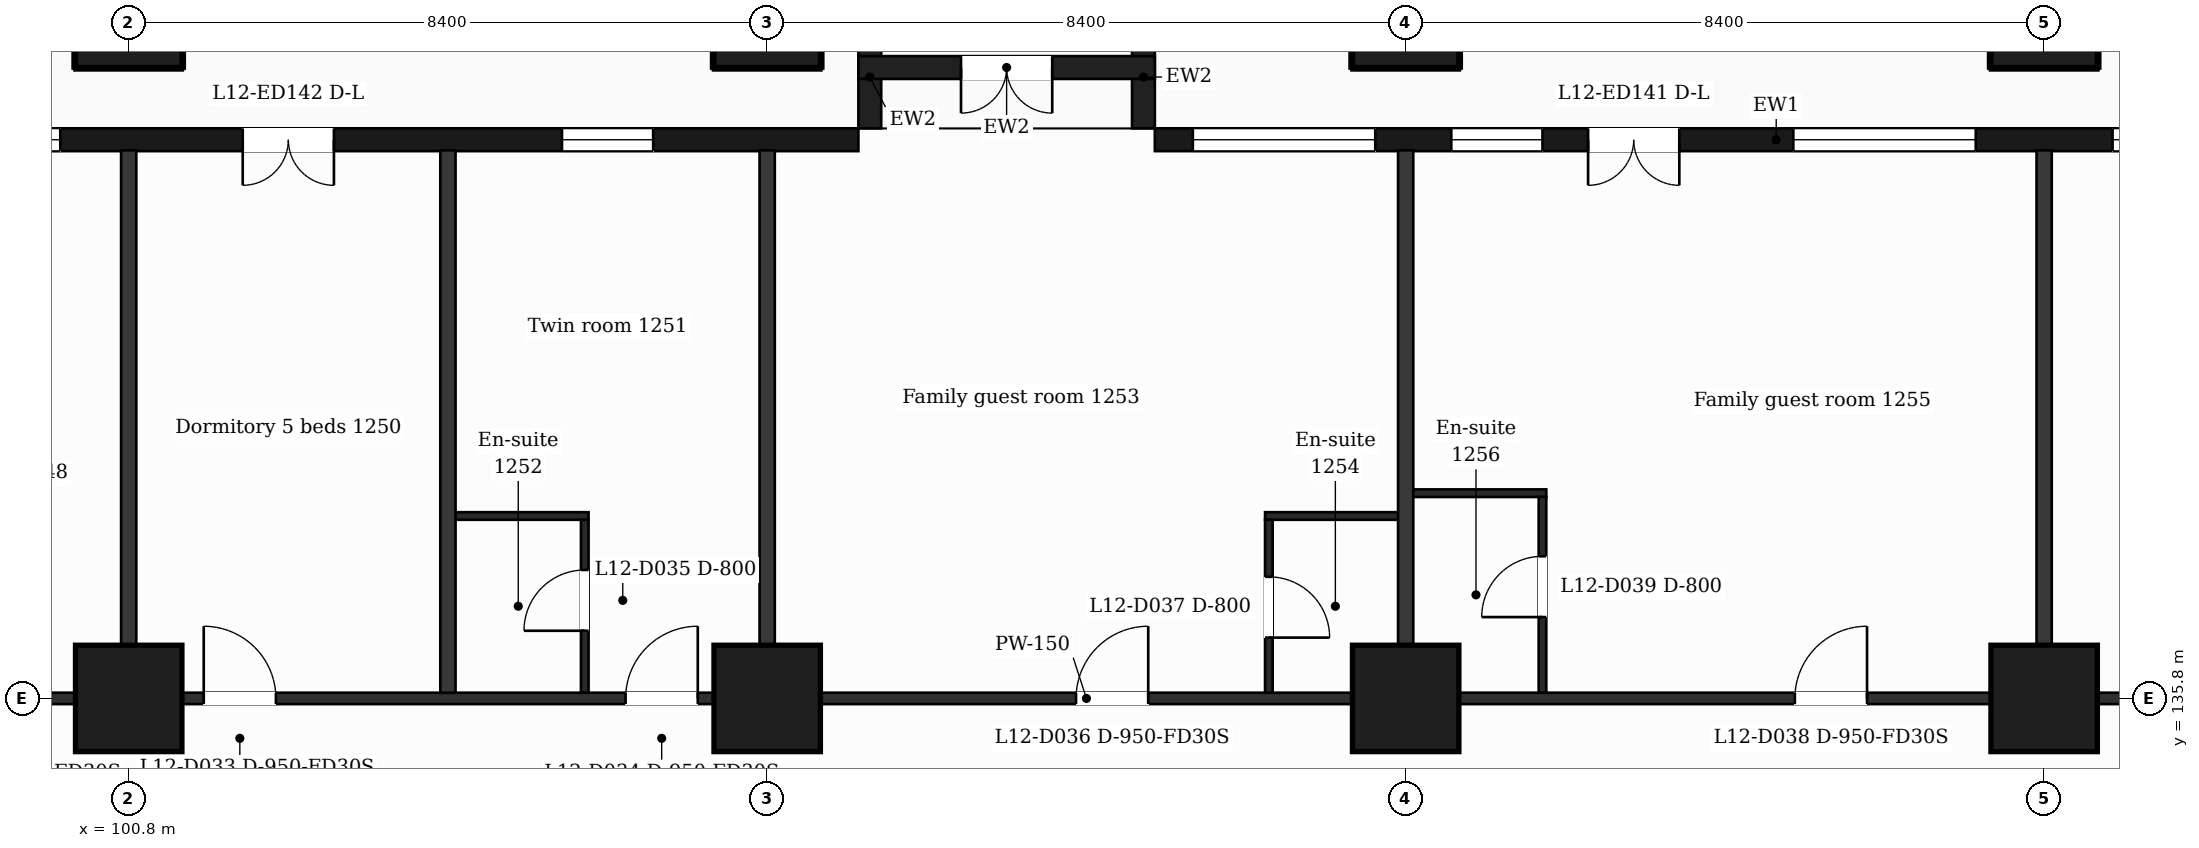
"""IFC4 building model, lengths in metres.
Left out: names, types, materials, properties, quantities, classifications, styles, units other than length and angle.
Written with IfcOpenShell. Run it as: python <this file> out.ifc"""

import sys

from ifc_helpers import new_model, si_unit, direction, frame, frame_2d, origin, origin_2d, place, context, subcontext, project, spatial, rectangle, extrude, element, fill, save


model = new_model("IFC4")
c1 = context("Model", 3, precision=1e-05, world=origin(), true_north=direction((0.0, 1.0)))
c2 = subcontext(c1, "Body", "Model", "MODEL_VIEW")
j1 = project(units=[si_unit("LENGTHUNIT", "METRE"), si_unit("PLANEANGLEUNIT", "RADIAN")], contexts=[c1])
p1 = place(None, origin())
s1 = spatial("IfcSite", under=j1, at=p1, CompositionType="ELEMENT")
p2 = place(p1, origin())
s2 = spatial("IfcBuilding", under=s1, at=p2, CompositionType="ELEMENT")
p3 = place(p2, frame((0.0, 0.0, 60.0)))
s3 = spatial("IfcBuildingStorey", under=s2, at=p3, CompositionType="ELEMENT", Elevation=60.0)
for number, where, z_axis, x_axis in (
    (1, (100.8, 135.8, 0.0), (0.0, 0.0, 1.0), (1.0, 0.0, 0.0)),
    (2, (109.2, 135.8, 0.0), (0.0, 0.0, 1.0), (1.0, 0.0, 0.0)),
    (3, (117.6, 135.8, 0.0), (0.0, 0.0, 1.0), (1.0, 0.0, 0.0)),
    (4, (126.0, 135.8, 0.0), (0.0, 0.0, 1.0), (1.0, 0.0, 0.0)),
    (5, (100.8, 144.8, 0.0), (0.0, 0.0, 1.0), (1.0, 0.0, 0.0)),
    (6, (109.2, 144.8, 0.0), (0.0, 0.0, 1.0), (1.0, 0.0, 0.0)),
    (7, (117.6, 144.8, 0.0), (0.0, 0.0, 1.0), (1.0, 0.0, 0.0)),
    (8, (126.0, 144.8, 0.0), (0.0, 0.0, 1.0), (1.0, 0.0, 0.0)),
):
    element("IfcColumn", number, at=place(p3, frame(where, z_axis=z_axis, x_axis=x_axis)), inside=s3, PredefinedType="COLUMN", context=c2, shape_type="SweptSolid", body=[
        extrude(rectangle(XDim=1.4, YDim=1.4, at=origin_2d()), origin(), (0.0, 0.0, 1.0), 3.5),
    ])
p4 = place(p3, frame((130.65, 143.15, 0.0), z_axis=(0.0, 0.0, 1.0), x_axis=(-1.0, 0.0, 0.0)))
e9 = element("IfcWall", 9, at=p4, inside=s3, PredefinedType="SOLIDWALL", context=c2, shape_type="SweptSolid", body=[
    extrude(rectangle(XDim=16.35, YDim=0.3, at=frame_2d((8.175, 0.0))), origin(), (0.0, 0.0, 1.0), 3.18),
])
p5 = place(p4, frame((1.35, 0.0, 0.9)))
e10 = element("IfcOpeningElement", 10, at=p5, cuts=e9, PredefinedType="OPENING", context=c2, shape_type="SweptSolid", body=[
    extrude(rectangle(XDim=2.4, YDim=2.1, at=frame_2d((1.2, 1.05))), frame((0.0, 0.16, 0.0), z_axis=(0.0, -1.0, 0.0), x_axis=(1.0, 0.0, 0.0)), (0.0, 0.0, 1.0), 0.32),
])
p6 = place(p4, frame((5.55, 0.0, 0.9)))
e11 = element("IfcOpeningElement", 11, at=p6, cuts=e9, PredefinedType="OPENING", context=c2, shape_type="SweptSolid", body=[
    extrude(rectangle(XDim=2.4, YDim=2.1, at=frame_2d((1.2, 1.05))), frame((0.0, 0.16, 0.0), z_axis=(0.0, -1.0, 0.0), x_axis=(1.0, 0.0, 0.0)), (0.0, 0.0, 1.0), 0.32),
])
p7 = place(p4, frame((9.45, 0.0, 0.0)))
e12 = element("IfcOpeningElement", 12, at=p7, cuts=e9, PredefinedType="OPENING", context=c2, shape_type="SweptSolid", body=[
    extrude(rectangle(XDim=1.2, YDim=2.4, at=frame_2d((0.6, 1.2))), frame((0.0, 0.16, 0.0), z_axis=(0.0, -1.0, 0.0), x_axis=(1.0, 0.0, 0.0)), (0.0, 0.0, 1.0), 0.32),
])
p8 = place(p4, frame((11.25, 0.0, 0.9)))
e13 = element("IfcOpeningElement", 13, at=p8, cuts=e9, PredefinedType="OPENING", context=c2, shape_type="SweptSolid", body=[
    extrude(rectangle(XDim=1.2, YDim=2.1, at=frame_2d((0.6, 1.05))), frame((0.0, 0.16, 0.0), z_axis=(0.0, -1.0, 0.0), x_axis=(1.0, 0.0, 0.0)), (0.0, 0.0, 1.0), 0.32),
])
p9 = place(p4, frame((13.45, 0.0, 0.9)))
e14 = element("IfcOpeningElement", 14, at=p9, cuts=e9, PredefinedType="OPENING", context=c2, shape_type="SweptSolid", body=[
    extrude(rectangle(XDim=2.4, YDim=2.1, at=frame_2d((1.2, 1.05))), frame((0.0, 0.16, 0.0), z_axis=(0.0, -1.0, 0.0), x_axis=(1.0, 0.0, 0.0)), (0.0, 0.0, 1.0), 0.32),
])
p10 = place(p3, frame((110.4, 143.15, 0.0), z_axis=(0.0, 0.0, 1.0), x_axis=(-1.0, 0.0, 0.0)))
e15 = element("IfcWall", 15, at=p10, inside=s3, PredefinedType="SOLIDWALL", context=c2, shape_type="SweptSolid", body=[
    extrude(rectangle(XDim=14.4, YDim=0.3, at=frame_2d((7.2, 0.0))), origin(), (0.0, 0.0, 1.0), 3.18),
])
p11 = place(p10, frame((2.7, 0.0, 0.9)))
e16 = element("IfcOpeningElement", 16, at=p11, cuts=e15, PredefinedType="OPENING", context=c2, shape_type="SweptSolid", body=[
    extrude(rectangle(XDim=1.2, YDim=2.1, at=frame_2d((0.6, 1.05))), frame((0.0, 0.16, 0.0), z_axis=(0.0, -1.0, 0.0), x_axis=(1.0, 0.0, 0.0)), (0.0, 0.0, 1.0), 0.32),
])
p12 = place(p10, frame((6.9, 0.0, 0.0)))
e17 = element("IfcOpeningElement", 17, at=p12, cuts=e15, PredefinedType="OPENING", context=c2, shape_type="SweptSolid", body=[
    extrude(rectangle(XDim=1.2, YDim=2.4, at=frame_2d((0.6, 1.2))), frame((0.0, 0.16, 0.0), z_axis=(0.0, -1.0, 0.0), x_axis=(1.0, 0.0, 0.0)), (0.0, 0.0, 1.0), 0.32),
])
p13 = place(p10, frame((10.5, 0.0, 0.9)))
e18 = element("IfcOpeningElement", 18, at=p13, cuts=e15, PredefinedType="OPENING", context=c2, shape_type="SweptSolid", body=[
    extrude(rectangle(XDim=2.4, YDim=2.1, at=frame_2d((1.2, 1.05))), frame((0.0, 0.16, 0.0), z_axis=(0.0, -1.0, 0.0), x_axis=(1.0, 0.0, 0.0)), (0.0, 0.0, 1.0), 0.32),
])
for number, where, z_axis, x_axis in (
    (19, (114.15, 143.3, 0.0), (0.0, 0.0, 1.0), (0.0, 1.0, 0.0)),
    (20, (110.55, 143.3, 0.0), (0.0, 0.0, 1.0), (0.0, 1.0, 0.0)),
):
    element("IfcWall", number, at=place(p3, frame(where, z_axis=z_axis, x_axis=x_axis)), inside=s3, PredefinedType="SOLIDWALL", context=c2, shape_type="SweptSolid", body=[
        extrude(rectangle(XDim=1.35, YDim=0.3, at=frame_2d((0.675, 0.0))), origin(), (0.0, 0.0, 1.0), 3.18),
    ])
p14 = place(p3, frame((114.3, 144.1, 0.0), z_axis=(0.0, 0.0, 1.0), x_axis=(-1.0, 0.0, 0.0)))
e21 = element("IfcWall", 21, at=p14, inside=s3, PredefinedType="SOLIDWALL", context=c2, shape_type="SweptSolid", body=[
    extrude(rectangle(XDim=3.9, YDim=0.3, at=frame_2d((1.95, 0.0))), origin(), (0.0, 0.0, 1.0), 3.18),
])
p15 = place(p14, frame((1.35, 0.0, 0.0)))
e22 = element("IfcOpeningElement", 22, at=p15, cuts=e21, PredefinedType="OPENING", context=c2, shape_type="SweptSolid", body=[
    extrude(rectangle(XDim=1.2, YDim=2.4, at=frame_2d((0.6, 1.2))), frame((0.0, 0.16, 0.0), z_axis=(0.0, -1.0, 0.0), x_axis=(1.0, 0.0, 0.0)), (0.0, 0.0, 1.0), 0.32),
])
p16 = place(p3, frame((90.895, 135.8, 0.0), z_axis=(0.0, 0.0, 1.0), x_axis=(1.0, 0.0, 0.0)))
e23 = element("IfcWall", 23, at=p16, inside=s3, PredefinedType="PARTITIONING", context=c2, shape_type="SweptSolid", body=[
    extrude(rectangle(XDim=45.011, YDim=0.15, at=frame_2d((22.505, 0.0))), origin(), (0.0, 0.0, 1.0), 3.18),
])
p17 = place(p16, frame((7.675, 0.0, 0.0)))
e24 = element("IfcOpeningElement", 24, at=p17, cuts=e23, PredefinedType="OPENING", context=c2, shape_type="SweptSolid", body=[
    extrude(rectangle(XDim=1.0, YDim=2.1, at=frame_2d((0.5, 1.05))), frame((0.0, 0.085, 0.0), z_axis=(0.0, -1.0, 0.0), x_axis=(1.0, 0.0, 0.0)), (0.0, 0.0, 1.0), 0.17),
])
p18 = place(p16, frame((10.892, 0.0, 0.0)))
e25 = element("IfcOpeningElement", 25, at=p18, cuts=e23, PredefinedType="OPENING", context=c2, shape_type="SweptSolid", body=[
    extrude(rectangle(XDim=0.95, YDim=2.1, at=frame_2d((0.475, 1.05))), frame((0.0, 0.085, 0.0), z_axis=(0.0, -1.0, 0.0), x_axis=(1.0, 0.0, 0.0)), (0.0, 0.0, 1.0), 0.17),
])
p19 = place(p16, frame((16.442, 0.0, 0.0)))
e26 = element("IfcOpeningElement", 26, at=p19, cuts=e23, PredefinedType="OPENING", context=c2, shape_type="SweptSolid", body=[
    extrude(rectangle(XDim=0.95, YDim=2.1, at=frame_2d((0.475, 1.05))), frame((0.0, 0.085, 0.0), z_axis=(0.0, -1.0, 0.0), x_axis=(1.0, 0.0, 0.0)), (0.0, 0.0, 1.0), 0.17),
])
p20 = place(p16, frame((22.368, 0.0, 0.0)))
e27 = element("IfcOpeningElement", 27, at=p20, cuts=e23, PredefinedType="OPENING", context=c2, shape_type="SweptSolid", body=[
    extrude(rectangle(XDim=0.95, YDim=2.1, at=frame_2d((0.475, 1.05))), frame((0.0, 0.085, 0.0), z_axis=(0.0, -1.0, 0.0), x_axis=(1.0, 0.0, 0.0)), (0.0, 0.0, 1.0), 0.17),
])
p21 = place(p16, frame((31.825, 0.0, 0.0)))
e28 = element("IfcOpeningElement", 28, at=p21, cuts=e23, PredefinedType="OPENING", context=c2, shape_type="SweptSolid", body=[
    extrude(rectangle(XDim=0.95, YDim=2.1, at=frame_2d((0.475, 1.05))), frame((0.0, 0.085, 0.0), z_axis=(0.0, -1.0, 0.0), x_axis=(1.0, 0.0, 0.0)), (0.0, 0.0, 1.0), 0.17),
])
p22 = place(p16, frame((39.814, 0.0, 0.0)))
e29 = element("IfcOpeningElement", 29, at=p22, cuts=e23, PredefinedType="OPENING", context=c2, shape_type="SweptSolid", body=[
    extrude(rectangle(XDim=0.95, YDim=2.1, at=frame_2d((0.475, 1.05))), frame((0.0, 0.085, 0.0), z_axis=(0.0, -1.0, 0.0), x_axis=(1.0, 0.0, 0.0)), (0.0, 0.0, 1.0), 0.17),
])
for number, where, z_axis, x_axis in (
    (30, (105.0, 138.2, 0.0), (0.0, 0.0, 1.0), (1.0, 0.0, 0.0)),
    (31, (115.75, 138.2, 0.0), (0.0, 0.0, 1.0), (1.0, 0.0, 0.0)),
):
    element("IfcWall", number, at=place(p3, frame(where, z_axis=z_axis, x_axis=x_axis)), inside=s3, PredefinedType="PARTITIONING", context=c2, shape_type="SweptSolid", body=[
        extrude(rectangle(XDim=1.85, YDim=0.1, at=frame_2d((0.925, 0.0))), origin(), (0.0, 0.0, 1.0), 3.18),
    ])
p23 = place(p3, frame((117.6, 138.5, 0.0), z_axis=(0.0, 0.0, 1.0), x_axis=(1.0, 0.0, 0.0)))
e32 = element("IfcWall", 32, at=p23, inside=s3, PredefinedType="PARTITIONING", context=c2, shape_type="SweptSolid", body=[
    extrude(rectangle(XDim=1.85, YDim=0.1, at=frame_2d((0.925, 0.0))), origin(), (0.0, 0.0, 1.0), 3.18),
])
for number, where, z_axis, x_axis in (
    (33, (100.8, 135.875, 0.0), (0.0, 0.0, 1.0), (0.0, 1.0, 0.0)),
    (34, (105.0, 135.875, 0.0), (0.0, 0.0, 1.0), (0.0, 1.0, 0.0)),
):
    element("IfcWall", number, at=place(p3, frame(where, z_axis=z_axis, x_axis=x_axis)), inside=s3, PredefinedType="PARTITIONING", context=c2, shape_type="SweptSolid", body=[
        extrude(rectangle(XDim=7.135, YDim=0.2, at=frame_2d((3.567, 0.0))), origin(), (0.0, 0.0, 1.0), 3.18),
    ])
p24 = place(p3, frame((106.8, 135.875, 0.0), z_axis=(0.0, 0.0, 1.0), x_axis=(0.0, 1.0, 0.0)))
e35 = element("IfcWall", 35, at=p24, inside=s3, PredefinedType="PARTITIONING", context=c2, shape_type="SweptSolid", body=[
    extrude(rectangle(XDim=2.275, YDim=0.1, at=frame_2d((1.137, 0.0))), origin(), (0.0, 0.0, 1.0), 3.18),
])
p25 = place(p24, frame((0.815, 0.0, 0.0)))
e36 = element("IfcOpeningElement", 36, at=p25, cuts=e35, PredefinedType="OPENING", context=c2, shape_type="SweptSolid", body=[
    extrude(rectangle(XDim=0.8, YDim=2.1, at=frame_2d((0.4, 1.05))), frame((0.0, 0.06, 0.0), z_axis=(0.0, -1.0, 0.0), x_axis=(1.0, 0.0, 0.0)), (0.0, 0.0, 1.0), 0.12),
])
p26 = place(p3, frame((109.2, 135.875, 0.0), z_axis=(0.0, 0.0, 1.0), x_axis=(0.0, 1.0, 0.0)))
e37 = element("IfcWall", 37, at=p26, inside=s3, PredefinedType="PARTITIONING", context=c2, shape_type="SweptSolid", body=[
    extrude(rectangle(XDim=7.135, YDim=0.2, at=frame_2d((3.567, 0.0))), origin(), (0.0, 0.0, 1.0), 3.18),
])
p27 = place(p3, frame((115.8, 135.875, 0.0), z_axis=(0.0, 0.0, 1.0), x_axis=(0.0, 1.0, 0.0)))
e38 = element("IfcWall", 38, at=p27, inside=s3, PredefinedType="PARTITIONING", context=c2, shape_type="SweptSolid", body=[
    extrude(rectangle(XDim=2.275, YDim=0.1, at=frame_2d((1.137, 0.0))), origin(), (0.0, 0.0, 1.0), 3.18),
])
p28 = place(p27, frame((0.725, 0.0, 0.0)))
e39 = element("IfcOpeningElement", 39, at=p28, cuts=e38, PredefinedType="OPENING", context=c2, shape_type="SweptSolid", body=[
    extrude(rectangle(XDim=0.8, YDim=2.1, at=frame_2d((0.4, 1.05))), frame((0.0, 0.06, 0.0), z_axis=(0.0, -1.0, 0.0), x_axis=(1.0, 0.0, 0.0)), (0.0, 0.0, 1.0), 0.12),
])
p29 = place(p3, frame((117.6, 135.875, 0.0), z_axis=(0.0, 0.0, 1.0), x_axis=(0.0, 1.0, 0.0)))
e40 = element("IfcWall", 40, at=p29, inside=s3, PredefinedType="PARTITIONING", context=c2, shape_type="SweptSolid", body=[
    extrude(rectangle(XDim=7.135, YDim=0.2, at=frame_2d((3.567, 0.0))), origin(), (0.0, 0.0, 1.0), 3.18),
])
p30 = place(p3, frame((119.4, 135.875, 0.0), z_axis=(0.0, 0.0, 1.0), x_axis=(0.0, 1.0, 0.0)))
e41 = element("IfcWall", 41, at=p30, inside=s3, PredefinedType="PARTITIONING", context=c2, shape_type="SweptSolid", body=[
    extrude(rectangle(XDim=2.575, YDim=0.1, at=frame_2d((1.288, 0.0))), origin(), (0.0, 0.0, 1.0), 3.18),
])
p31 = place(p30, frame((0.995, 0.0, 0.0)))
e42 = element("IfcOpeningElement", 42, at=p31, cuts=e41, PredefinedType="OPENING", context=c2, shape_type="SweptSolid", body=[
    extrude(rectangle(XDim=0.8, YDim=2.1, at=frame_2d((0.4, 1.05))), frame((0.0, 0.06, 0.0), z_axis=(0.0, -1.0, 0.0), x_axis=(1.0, 0.0, 0.0)), (0.0, 0.0, 1.0), 0.12),
])
p32 = place(p3, frame((126.0, 135.875, 0.0), z_axis=(0.0, 0.0, 1.0), x_axis=(0.0, 1.0, 0.0)))
e43 = element("IfcWall", 43, at=p32, inside=s3, PredefinedType="PARTITIONING", context=c2, shape_type="SweptSolid", body=[
    extrude(rectangle(XDim=7.135, YDim=0.2, at=frame_2d((3.567, 0.0))), origin(), (0.0, 0.0, 1.0), 3.18),
])
p33 = place(p5, origin())
e44 = element("IfcWindow", 44, at=p33, inside=s3, PartitioningType="SINGLE_PANEL", PredefinedType="WINDOW", context=c2, shape_type="SweptSolid", body=[
    extrude(rectangle(XDim=2.4, YDim=2.1, at=frame_2d((1.2, 1.05))), frame((0.0, 0.03, 0.0), z_axis=(0.0, -1.0, 0.0), x_axis=(1.0, 0.0, 0.0)), (0.0, 0.0, 1.0), 0.06),
])
fill(e10, e44)
p34 = place(p6, origin())
e45 = element("IfcWindow", 45, at=p34, inside=s3, PartitioningType="SINGLE_PANEL", PredefinedType="WINDOW", context=c2, shape_type="SweptSolid", body=[
    extrude(rectangle(XDim=2.4, YDim=2.1, at=frame_2d((1.2, 1.05))), frame((0.0, 0.03, 0.0), z_axis=(0.0, -1.0, 0.0), x_axis=(1.0, 0.0, 0.0)), (0.0, 0.0, 1.0), 0.06),
])
fill(e11, e45)
p35 = place(p7, origin())
e46 = element("IfcDoor", 46, at=p35, inside=s3, OperationType="DOUBLE_DOOR_SINGLE_SWING", PredefinedType="DOOR", context=c2, shape_type="SweptSolid", body=[
    extrude(rectangle(XDim=1.2, YDim=2.4, at=frame_2d((0.6, 1.2))), frame((0.0, 0.025, 0.0), z_axis=(0.0, -1.0, 0.0), x_axis=(1.0, 0.0, 0.0)), (0.0, 0.0, 1.0), 0.05),
])
fill(e12, e46)
p36 = place(p8, origin())
e47 = element("IfcWindow", 47, at=p36, inside=s3, PartitioningType="SINGLE_PANEL", PredefinedType="WINDOW", context=c2, shape_type="SweptSolid", body=[
    extrude(rectangle(XDim=1.2, YDim=2.1, at=frame_2d((0.6, 1.05))), frame((0.0, 0.03, 0.0), z_axis=(0.0, -1.0, 0.0), x_axis=(1.0, 0.0, 0.0)), (0.0, 0.0, 1.0), 0.06),
])
fill(e13, e47)
p37 = place(p9, origin())
e48 = element("IfcWindow", 48, at=p37, inside=s3, PartitioningType="SINGLE_PANEL", PredefinedType="WINDOW", context=c2, shape_type="SweptSolid", body=[
    extrude(rectangle(XDim=2.4, YDim=2.1, at=frame_2d((1.2, 1.05))), frame((0.0, 0.03, 0.0), z_axis=(0.0, -1.0, 0.0), x_axis=(1.0, 0.0, 0.0)), (0.0, 0.0, 1.0), 0.06),
])
fill(e14, e48)
p38 = place(p11, origin())
e49 = element("IfcWindow", 49, at=p38, inside=s3, PartitioningType="SINGLE_PANEL", PredefinedType="WINDOW", context=c2, shape_type="SweptSolid", body=[
    extrude(rectangle(XDim=1.2, YDim=2.1, at=frame_2d((0.6, 1.05))), frame((0.0, 0.03, 0.0), z_axis=(0.0, -1.0, 0.0), x_axis=(1.0, 0.0, 0.0)), (0.0, 0.0, 1.0), 0.06),
])
fill(e16, e49)
p39 = place(p12, origin())
e50 = element("IfcDoor", 50, at=p39, inside=s3, OperationType="DOUBLE_DOOR_SINGLE_SWING", PredefinedType="DOOR", context=c2, shape_type="SweptSolid", body=[
    extrude(rectangle(XDim=1.2, YDim=2.4, at=frame_2d((0.6, 1.2))), frame((0.0, 0.025, 0.0), z_axis=(0.0, -1.0, 0.0), x_axis=(1.0, 0.0, 0.0)), (0.0, 0.0, 1.0), 0.05),
])
fill(e17, e50)
p40 = place(p13, origin())
e51 = element("IfcWindow", 51, at=p40, inside=s3, PartitioningType="SINGLE_PANEL", PredefinedType="WINDOW", context=c2, shape_type="SweptSolid", body=[
    extrude(rectangle(XDim=2.4, YDim=2.1, at=frame_2d((1.2, 1.05))), frame((0.0, 0.03, 0.0), z_axis=(0.0, -1.0, 0.0), x_axis=(1.0, 0.0, 0.0)), (0.0, 0.0, 1.0), 0.06),
])
fill(e18, e51)
p41 = place(p15, origin())
e52 = element("IfcDoor", 52, at=p41, inside=s3, OperationType="DOUBLE_DOOR_SINGLE_SWING", PredefinedType="DOOR", context=c2, shape_type="SweptSolid", body=[
    extrude(rectangle(XDim=1.2, YDim=2.4, at=frame_2d((0.6, 1.2))), frame((0.0, 0.025, 0.0), z_axis=(0.0, -1.0, 0.0), x_axis=(1.0, 0.0, 0.0)), (0.0, 0.0, 1.0), 0.05),
])
fill(e22, e52)
p42 = place(p18, origin())
e53 = element("IfcDoor", 53, at=p42, inside=s3, OperationType="SINGLE_SWING_LEFT", PredefinedType="DOOR", context=c2, shape_type="SweptSolid", body=[
    extrude(rectangle(XDim=0.95, YDim=2.1, at=frame_2d((0.475, 1.05))), frame((0.0, 0.025, 0.0), z_axis=(0.0, -1.0, 0.0), x_axis=(1.0, 0.0, 0.0)), (0.0, 0.0, 1.0), 0.05),
])
fill(e25, e53)
p43 = place(p19, origin())
e54 = element("IfcDoor", 54, at=p43, inside=s3, OperationType="SINGLE_SWING_RIGHT", PredefinedType="DOOR", context=c2, shape_type="SweptSolid", body=[
    extrude(rectangle(XDim=0.95, YDim=2.1, at=frame_2d((0.475, 1.05))), frame((0.0, 0.025, 0.0), z_axis=(0.0, -1.0, 0.0), x_axis=(1.0, 0.0, 0.0)), (0.0, 0.0, 1.0), 0.05),
])
fill(e26, e54)
p44 = place(p25, origin())
e55 = element("IfcDoor", 55, at=p44, inside=s3, OperationType="SINGLE_SWING_LEFT", PredefinedType="DOOR", context=c2, shape_type="SweptSolid", body=[
    extrude(rectangle(XDim=0.8, YDim=2.1, at=frame_2d((0.4, 1.05))), frame((0.0, 0.025, 0.0), z_axis=(0.0, -1.0, 0.0), x_axis=(1.0, 0.0, 0.0)), (0.0, 0.0, 1.0), 0.05),
])
fill(e36, e55)
p45 = place(p20, origin())
e56 = element("IfcDoor", 56, at=p45, inside=s3, OperationType="SINGLE_SWING_RIGHT", PredefinedType="DOOR", context=c2, shape_type="SweptSolid", body=[
    extrude(rectangle(XDim=0.95, YDim=2.1, at=frame_2d((0.475, 1.05))), frame((0.0, 0.025, 0.0), z_axis=(0.0, -1.0, 0.0), x_axis=(1.0, 0.0, 0.0)), (0.0, 0.0, 1.0), 0.05),
])
fill(e27, e56)
p46 = place(p28, origin())
e57 = element("IfcDoor", 57, at=p46, inside=s3, OperationType="SINGLE_SWING_LEFT", PredefinedType="DOOR", context=c2, shape_type="SweptSolid", body=[
    extrude(rectangle(XDim=0.8, YDim=2.1, at=frame_2d((0.4, 1.05))), frame((0.0, 0.025, 0.0), z_axis=(0.0, -1.0, 0.0), x_axis=(1.0, 0.0, 0.0)), (0.0, 0.0, 1.0), 0.05),
])
fill(e39, e57)
p47 = place(p21, origin())
e58 = element("IfcDoor", 58, at=p47, inside=s3, OperationType="SINGLE_SWING_RIGHT", PredefinedType="DOOR", context=c2, shape_type="SweptSolid", body=[
    extrude(rectangle(XDim=0.95, YDim=2.1, at=frame_2d((0.475, 1.05))), frame((0.0, 0.025, 0.0), z_axis=(0.0, -1.0, 0.0), x_axis=(1.0, 0.0, 0.0)), (0.0, 0.0, 1.0), 0.05),
])
fill(e28, e58)
p48 = place(p31, origin())
e59 = element("IfcDoor", 59, at=p48, inside=s3, OperationType="SINGLE_SWING_LEFT", PredefinedType="DOOR", context=c2, shape_type="SweptSolid", body=[
    extrude(rectangle(XDim=0.8, YDim=2.1, at=frame_2d((0.4, 1.05))), frame((0.0, 0.025, 0.0), z_axis=(0.0, -1.0, 0.0), x_axis=(1.0, 0.0, 0.0)), (0.0, 0.0, 1.0), 0.05),
])
fill(e42, e59)
save(model, sys.argv[1])
